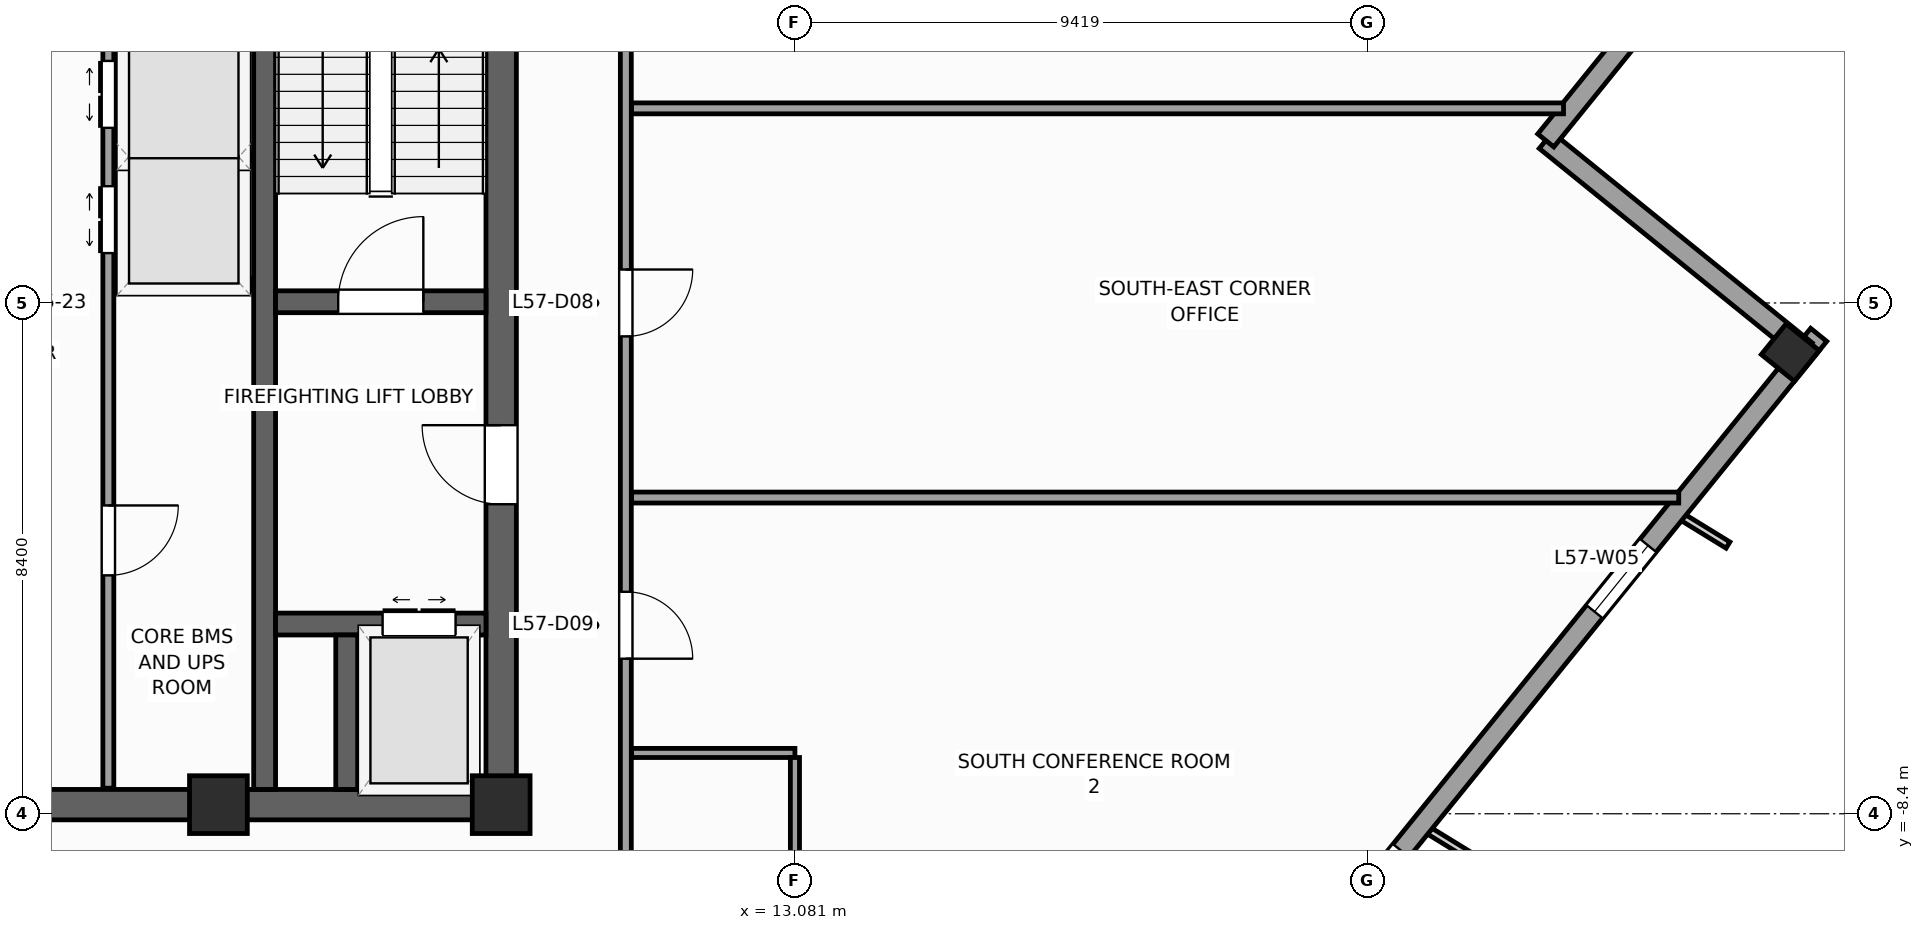
"""IFC4 building model, lengths in metres.
Left out: names, types, materials, properties, quantities, classifications, styles, units other than length and angle.
Written with IfcOpenShell. Run it as: python <this file> out.ifc"""

import sys

from ifc_helpers import new_model, si_unit, direction, frame, frame_2d, origin, origin_2d, place, context, subcontext, project, spatial, rectangle, extrude, source, transform, mapped, element, fill, save


model = new_model("IFC4")
c1 = context("Model", 3, precision=1e-05, world=origin(), true_north=direction((0.0, 1.0)))
c2 = subcontext(c1, "Body", "Model", "MODEL_VIEW")
j1 = project(units=[si_unit("LENGTHUNIT", "METRE"), si_unit("PLANEANGLEUNIT", "RADIAN")], contexts=[c1])
p1 = place(None, origin())
s1 = spatial("IfcSite", under=j1, at=p1, CompositionType="ELEMENT")
p2 = place(p1, origin())
s2 = spatial("IfcBuilding", under=s1, at=p2, CompositionType="ELEMENT")
p3 = place(p2, frame((0.0, 0.0, 236.8)))
s3 = spatial("IfcBuildingStorey", under=s2, at=p3, CompositionType="ELEMENT", Elevation=236.8)
p4 = place(p3, frame((-8.5, -8.25, 0.0), z_axis=(0.0, 0.0, 1.0), x_axis=(1.0, 0.0, 0.0)))
e1 = element("IfcWall", 1, at=p4, inside=s3, PredefinedType="SHEAR", context=c2, shape_type="SweptSolid", body=[
    extrude(rectangle(XDim=17.0, YDim=0.5, at=frame_2d((8.5, 0.0))), origin(), (0.0, 0.0, 1.0), 3.9),
])
p5 = place(p4, frame((7.85, 0.0, 0.0)))
e2 = element("IfcOpeningElement", 2, at=p5, cuts=e1, PredefinedType="OPENING", context=c2, shape_type="SweptSolid", body=[
    extrude(rectangle(XDim=1.3, YDim=2.2, at=frame_2d((0.65, 1.1))), frame((0.0, 0.26, 0.0), z_axis=(0.0, -1.0, 0.0), x_axis=(1.0, 0.0, 0.0)), (0.0, 0.0, 1.0), 0.52),
])
p6 = place(p3, frame((8.25, -8.0, 0.0), z_axis=(0.0, 0.0, 1.0), x_axis=(0.0, 1.0, 0.0)))
e3 = element("IfcWall", 3, at=p6, inside=s3, PredefinedType="SHEAR", context=c2, shape_type="SweptSolid", body=[
    extrude(rectangle(XDim=16.0, YDim=0.5, at=frame_2d((8.0, 0.0))), origin(), (0.0, 0.0, 1.0), 3.9),
])
p7 = place(p6, frame((4.69, 0.0, 0.0)))
e4 = element("IfcOpeningElement", 4, at=p7, cuts=e3, PredefinedType="OPENING", context=c2, shape_type="SweptSolid", body=[
    extrude(rectangle(XDim=1.3, YDim=2.2, at=frame_2d((0.65, 1.1))), frame((0.0, 0.26, 0.0), z_axis=(0.0, -1.0, 0.0), x_axis=(1.0, 0.0, 0.0)), (0.0, 0.0, 1.0), 0.52),
])
p8 = place(p3, frame((4.36, -8.0, 0.0), z_axis=(0.0, 0.0, 1.0), x_axis=(0.0, 1.0, 0.0)))
e5 = element("IfcWall", 5, at=p8, inside=s3, PredefinedType="SHEAR", context=c2, shape_type="SweptSolid", body=[
    extrude(rectangle(XDim=16.0, YDim=0.36, at=frame_2d((8.0, 0.0))), origin(), (0.0, 0.0, 1.0), 3.9),
])
p9 = place(p3, frame((4.54, 0.02, 0.0), z_axis=(0.0, 0.0, 1.0), x_axis=(1.0, 0.0, 0.0)))
e6 = element("IfcWall", 6, at=p9, inside=s3, PredefinedType="SHEAR", context=c2, shape_type="SweptSolid", body=[
    extrude(rectangle(XDim=3.46, YDim=0.36, at=frame_2d((1.73, 0.0))), origin(), (0.0, 0.0, 1.0), 3.9),
])
p10 = place(p9, frame((1.03, 0.0, 0.0)))
e7 = element("IfcOpeningElement", 7, at=p10, cuts=e6, PredefinedType="OPENING", context=c2, shape_type="SweptSolid", body=[
    extrude(rectangle(XDim=1.4, YDim=2.2, at=frame_2d((0.7, 1.1))), frame((0.0, 0.19, 0.0), z_axis=(0.0, -1.0, 0.0), x_axis=(1.0, 0.0, 0.0)), (0.0, 0.0, 1.0), 0.38),
])
p11 = place(p3, frame((4.54, -5.28, 0.0), z_axis=(0.0, 0.0, 1.0), x_axis=(1.0, 0.0, 0.0)))
e8 = element("IfcWall", 8, at=p11, inside=s3, PredefinedType="SHEAR", context=c2, shape_type="SweptSolid", body=[
    extrude(rectangle(XDim=3.46, YDim=0.36, at=frame_2d((1.73, 0.0))), origin(), (0.0, 0.0, 1.0), 3.9),
])
p12 = place(p11, frame((1.76, 0.0, 0.0)))
e9 = element("IfcOpeningElement", 9, at=p12, cuts=e8, PredefinedType="OPENING", context=c2, shape_type="SweptSolid", body=[
    extrude(rectangle(XDim=1.2, YDim=2.25, at=frame_2d((0.6, 1.125))), frame((0.0, 0.19, 0.0), z_axis=(0.0, -1.0, 0.0), x_axis=(1.0, 0.0, 0.0)), (0.0, 0.0, 1.0), 0.38),
])
p13 = place(p3, frame((5.71, -8.0, 0.0), z_axis=(0.0, 0.0, 1.0), x_axis=(0.0, 1.0, 0.0)))
e10 = element("IfcWall", 10, at=p13, inside=s3, PredefinedType="SHEAR", context=c2, shape_type="SweptSolid", body=[
    extrude(rectangle(XDim=2.54, YDim=0.36, at=frame_2d((1.27, 0.0))), origin(), (0.0, 0.0, 1.0), 3.9),
])
m1 = source(origin(), c2, "Body", "SweptSolid", [
    extrude(rectangle(XDim=0.95, YDim=0.95, at=origin_2d()), origin(), (0.0, 0.0, 1.0), 3.9),
])
for number, where, z_axis, x_axis in (
    (11, (8.25, -8.25, 0.0), (0.0, 0.0, 1.0), (1.0, 0.0, 0.0)),
    (12, (3.6, -8.25, 0.0), (0.0, 0.0, 1.0), (1.0, 0.0, 0.0)),
):
    element("IfcColumn", number, at=place(p3, frame(where, z_axis=z_axis, x_axis=x_axis)), inside=s3, PredefinedType="PILASTER", context=c2, shape_type="MappedRepresentation", body=[
        mapped(m1, transform((0.0, 0.0, 0.0), scale=1.0)),
    ])
m2 = source(origin(), c2, "Body", "SweptSolid", [
    extrude(rectangle(XDim=0.65, YDim=0.7, at=origin_2d()), origin(), (0.0, 0.0, 1.0), 3.9),
])
p14 = place(p3, frame((29.45, -0.815, 0.0), z_axis=(0.0, 0.0, 1.0), x_axis=(0.62932039105, 0.777145961457, 0.0)))
e13 = element("IfcColumn", 13, at=p14, inside=s3, PredefinedType="COLUMN", context=c2, shape_type="MappedRepresentation", body=[
    mapped(m2, transform((0.0, 0.0, 0.0), scale=1.0)),
])
p15 = place(p3, frame((6.733, -29.154, 0.0), z_axis=(0.0, 0.0, 1.0), x_axis=(0.629325378072, 0.77714192302, 0.0)))
e14 = element("IfcWall", 14, at=p15, inside=s3, PredefinedType="STANDARD", context=c2, shape_type="SweptSolid", body=[
    extrude(rectangle(XDim=36.84, YDim=0.34, at=frame_2d((18.42, 0.0))), origin(), (0.0, 0.0, 1.0), 2.96),
])
p16 = place(p15, frame((12.295, 0.0, 0.0)))
e15 = element("IfcOpeningElement", 15, at=p16, cuts=e14, PredefinedType="OPENING", context=c2, shape_type="SweptSolid", body=[
    extrude(rectangle(XDim=1.05, YDim=2.25, at=frame_2d((0.525, 1.125))), frame((0.0, 0.18, 0.0), z_axis=(0.0, -1.0, 0.0), x_axis=(1.0, 0.0, 0.0)), (0.0, 0.0, 1.0), 0.36),
])
p17 = place(p15, frame((3.721, 0.0, 0.48)))
e16 = element("IfcOpeningElement", 16, at=p17, cuts=e14, PredefinedType="OPENING", context=c2, shape_type="SweptSolid", body=[
    extrude(rectangle(XDim=1.4, YDim=2.4, at=frame_2d((0.7, 1.2))), frame((0.0, 0.18, 0.0), z_axis=(0.0, -1.0, 0.0), x_axis=(1.0, 0.0, 0.0)), (0.0, 0.0, 1.0), 0.36),
])
p18 = place(p15, frame((7.559, 0.0, 0.58)))
e17 = element("IfcOpeningElement", 17, at=p18, cuts=e14, PredefinedType="OPENING", context=c2, shape_type="SweptSolid", body=[
    extrude(rectangle(XDim=1.75, YDim=2.3, at=frame_2d((0.875, 1.15))), frame((0.0, 0.18, 0.0), z_axis=(0.0, -1.0, 0.0), x_axis=(1.0, 0.0, 0.0)), (0.0, 0.0, 1.0), 0.36),
])
p19 = place(p15, frame((16.058, 0.0, 0.58)))
e18 = element("IfcOpeningElement", 18, at=p19, cuts=e14, PredefinedType="OPENING", context=c2, shape_type="SweptSolid", body=[
    extrude(rectangle(XDim=1.75, YDim=2.3, at=frame_2d((0.875, 1.15))), frame((0.0, 0.18, 0.0), z_axis=(0.0, -1.0, 0.0), x_axis=(1.0, 0.0, 0.0)), (0.0, 0.0, 1.0), 0.36),
])
p20 = place(p15, frame((24.176, 0.0, 0.58)))
e19 = element("IfcOpeningElement", 19, at=p20, cuts=e14, PredefinedType="OPENING", context=c2, shape_type="SweptSolid", body=[
    extrude(rectangle(XDim=1.75, YDim=2.3, at=frame_2d((0.875, 1.15))), frame((0.0, 0.18, 0.0), z_axis=(0.0, -1.0, 0.0), x_axis=(1.0, 0.0, 0.0)), (0.0, 0.0, 1.0), 0.36),
])
p21 = place(p15, frame((30.982, 0.0, 0.48)))
e20 = element("IfcOpeningElement", 20, at=p21, cuts=e14, PredefinedType="OPENING", context=c2, shape_type="SweptSolid", body=[
    extrude(rectangle(XDim=1.4, YDim=2.4, at=frame_2d((0.7, 1.2))), frame((0.0, 0.18, 0.0), z_axis=(0.0, -1.0, 0.0), x_axis=(1.0, 0.0, 0.0)), (0.0, 0.0, 1.0), 0.36),
])
p22 = place(p3, frame((29.703, -0.789, 0.0), z_axis=(0.0, 0.0, 1.0), x_axis=(-0.77714355312, 0.629323365087, 0.0)))
e21 = element("IfcWall", 21, at=p22, inside=s3, PredefinedType="STANDARD", context=c2, shape_type="SweptSolid", body=[
    extrude(rectangle(XDim=5.5, YDim=0.34, at=frame_2d((2.75, 0.0))), origin(), (0.0, 0.0, 1.0), 3.66),
])
p23 = place(p3, frame((25.429, 2.673, 0.0), z_axis=(0.0, 0.0, 1.0), x_axis=(0.629299794138, 0.777162640055, 0.0)))
e22 = element("IfcWall", 22, at=p23, inside=s3, PredefinedType="STANDARD", context=c2, shape_type="SweptSolid", body=[
    extrude(rectangle(XDim=5.67, YDim=0.34, at=frame_2d((2.835, 0.0))), origin(), (0.0, 0.0, 1.0), 3.66),
])
p24 = place(p23, frame((2.135, 0.0, 0.48)))
e23 = element("IfcOpeningElement", 23, at=p24, cuts=e22, PredefinedType="OPENING", context=c2, shape_type="SweptSolid", body=[
    extrude(rectangle(XDim=1.4, YDim=2.4, at=frame_2d((0.7, 1.2))), frame((0.0, 0.18, 0.0), z_axis=(0.0, -1.0, 0.0), x_axis=(1.0, 0.0, 0.0)), (0.0, 0.0, 1.0), 0.36),
])
p25 = place(p3, frame((1.79, -7.98, 0.0), z_axis=(0.0, 0.0, 1.0), x_axis=(0.0, 1.0, 0.0)))
e24 = element("IfcWall", 24, at=p25, inside=s3, PredefinedType="PARTITIONING", context=c2, shape_type="SweptSolid", body=[
    extrude(rectangle(XDim=12.38, YDim=0.18, at=frame_2d((6.19, 0.0))), origin(), (0.0, 0.0, 1.0), 3.66),
])
p26 = place(p25, frame((8.8, 0.0, 0.0)))
e25 = element("IfcOpeningElement", 25, at=p26, cuts=e24, PredefinedType="OPENING", context=c2, shape_type="SweptSolid", body=[
    extrude(rectangle(XDim=1.1, YDim=2.2, at=frame_2d((0.55, 1.1))), frame((0.0, 0.1, 0.0), z_axis=(0.0, -1.0, 0.0), x_axis=(1.0, 0.0, 0.0)), (0.0, 0.0, 1.0), 0.2),
])
p27 = place(p25, frame((10.86, 0.0, 0.0)))
e26 = element("IfcOpeningElement", 26, at=p27, cuts=e24, PredefinedType="OPENING", context=c2, shape_type="SweptSolid", body=[
    extrude(rectangle(XDim=1.1, YDim=2.2, at=frame_2d((0.55, 1.1))), frame((0.0, 0.1, 0.0), z_axis=(0.0, -1.0, 0.0), x_axis=(1.0, 0.0, 0.0)), (0.0, 0.0, 1.0), 0.2),
])
p28 = place(p25, frame((3.5, 0.0, 0.0)))
e27 = element("IfcOpeningElement", 27, at=p28, cuts=e24, PredefinedType="OPENING", context=c2, shape_type="SweptSolid", body=[
    extrude(rectangle(XDim=1.15, YDim=2.25, at=frame_2d((0.575, 1.125))), frame((0.0, 0.1, 0.0), z_axis=(0.0, -1.0, 0.0), x_axis=(1.0, 0.0, 0.0)), (0.0, 0.0, 1.0), 0.2),
])
p29 = place(p3, frame((1.89, 0.3, 0.0), z_axis=(0.0, 0.0, 1.0), x_axis=(1.0, 0.0, 0.0)))
e28 = element("IfcWall", 28, at=p29, inside=s3, PredefinedType="PARTITIONING", context=c2, shape_type="SweptSolid", body=[
    extrude(rectangle(XDim=2.28, YDim=0.18, at=frame_2d((1.14, 0.0))), origin(), (0.0, 0.0, 1.0), 3.66),
])
p30 = place(p3, frame((1.9, 2.4, 0.0), z_axis=(0.0, 0.0, 1.0), x_axis=(1.0, 0.0, 0.0)))
e29 = element("IfcWall", 29, at=p30, inside=s3, PredefinedType="PARTITIONING", context=c2, shape_type="SweptSolid", body=[
    extrude(rectangle(XDim=2.26, YDim=0.12, at=frame_2d((1.13, 0.0))), origin(), (0.0, 0.0, 1.0), 3.66),
])
p31 = place(p3, frame((10.3, -10.2, 0.0), z_axis=(0.0, 0.0, 1.0), x_axis=(0.0, 1.0, 0.0)))
e30 = element("IfcWall", 30, at=p31, inside=s3, PredefinedType="PARTITIONING", context=c2, shape_type="SweptSolid", body=[
    extrude(rectangle(XDim=20.4, YDim=0.18, at=frame_2d((10.2, 0.0))), origin(), (0.0, 0.0, 1.0), 3.66),
])
p32 = place(p31, frame((14.95, 0.0, 0.0)))
e31 = element("IfcOpeningElement", 31, at=p32, cuts=e30, PredefinedType="OPENING", context=c2, shape_type="SweptSolid", body=[
    extrude(rectangle(XDim=1.1, YDim=2.2, at=frame_2d((0.55, 1.1))), frame((0.0, 0.1, 0.0), z_axis=(0.0, -1.0, 0.0), x_axis=(1.0, 0.0, 0.0)), (0.0, 0.0, 1.0), 0.2),
])
p33 = place(p31, frame((9.65, 0.0, 0.0)))
e32 = element("IfcOpeningElement", 32, at=p33, cuts=e30, PredefinedType="OPENING", context=c2, shape_type="SweptSolid", body=[
    extrude(rectangle(XDim=1.1, YDim=2.2, at=frame_2d((0.55, 1.1))), frame((0.0, 0.1, 0.0), z_axis=(0.0, -1.0, 0.0), x_axis=(1.0, 0.0, 0.0)), (0.0, 0.0, 1.0), 0.2),
])
p34 = place(p31, frame((4.35, 0.0, 0.0)))
e33 = element("IfcOpeningElement", 33, at=p34, cuts=e30, PredefinedType="OPENING", context=c2, shape_type="SweptSolid", body=[
    extrude(rectangle(XDim=1.1, YDim=2.2, at=frame_2d((0.55, 1.1))), frame((0.0, 0.1, 0.0), z_axis=(0.0, -1.0, 0.0), x_axis=(1.0, 0.0, 0.0)), (0.0, 0.0, 1.0), 0.2),
])
p35 = place(p3, frame((10.395, 3.2, 0.0), z_axis=(0.0, 0.0, 1.0), x_axis=(1.0, 0.0, 0.0)))
e34 = element("IfcWall", 34, at=p35, inside=s3, PredefinedType="PARTITIONING", context=c2, shape_type="SweptSolid", body=[
    extrude(rectangle(XDim=15.326, YDim=0.18, at=frame_2d((7.663, 0.0))), origin(), (0.0, 0.0, 1.0), 3.66),
])
p36 = place(p3, frame((10.395, -3.2, 0.0), z_axis=(0.0, 0.0, 1.0), x_axis=(1.0, 0.0, 0.0)))
e35 = element("IfcWall", 35, at=p36, inside=s3, PredefinedType="PARTITIONING", context=c2, shape_type="SweptSolid", body=[
    extrude(rectangle(XDim=17.22, YDim=0.18, at=frame_2d((8.61, 0.0))), origin(), (0.0, 0.0, 1.0), 3.66),
])
p37 = place(p3, frame((10.395, -7.4, 0.0), z_axis=(0.0, 0.0, 1.0), x_axis=(1.0, 0.0, 0.0)))
e36 = element("IfcWall", 36, at=p37, inside=s3, PredefinedType="PARTITIONING", context=c2, shape_type="SweptSolid", body=[
    extrude(rectangle(XDim=2.686, YDim=0.15, at=frame_2d((1.343, 0.0))), origin(), (0.0, 0.0, 1.0), 3.66),
])
p38 = place(p3, frame((13.081, -7.475, 0.0), z_axis=(0.0, 0.0, 1.0), x_axis=(0.0, -1.0, 0.0)))
e37 = element("IfcWall", 37, at=p38, inside=s3, PredefinedType="PARTITIONING", context=c2, shape_type="SweptSolid", body=[
    extrude(rectangle(XDim=13.673, YDim=0.15, at=frame_2d((6.837, 0.0))), origin(), (0.0, 0.0, 1.0), 2.76),
])
m3 = source(origin(), c2, "Body", "SweptSolid", [
    extrude(rectangle(XDim=1.75, YDim=2.3, at=frame_2d((0.875, 1.15))), frame((0.0, 0.03, 0.0), z_axis=(0.0, -1.0, 0.0), x_axis=(1.0, 0.0, 0.0)), (0.0, 0.0, 1.0), 0.06),
])
p39 = place(p20, origin())
e38 = element("IfcWindow", 38, at=p39, inside=s3, PartitioningType="SINGLE_PANEL", PredefinedType="WINDOW", context=c2, shape_type="MappedRepresentation", body=[
    mapped(m3, transform((0.0, 0.0, 0.0), scale=1.0)),
])
fill(e19, e38)
m4 = source(origin(), c2, "Body", "SweptSolid", [
    extrude(rectangle(XDim=1.4, YDim=2.4, at=frame_2d((0.7, 1.2))), frame((0.0, 0.03, 0.0), z_axis=(0.0, -1.0, 0.0), x_axis=(1.0, 0.0, 0.0)), (0.0, 0.0, 1.0), 0.06),
])
p40 = place(p21, origin())
e39 = element("IfcWindow", 39, at=p40, inside=s3, PartitioningType="SINGLE_PANEL", PredefinedType="WINDOW", context=c2, shape_type="MappedRepresentation", body=[
    mapped(m4, transform((0.0, 0.0, 0.0), scale=1.0)),
])
fill(e20, e39)
m5 = source(origin(), c2, "Body", "SweptSolid", [
    extrude(rectangle(XDim=1.4, YDim=2.2, at=frame_2d((0.7, 1.1))), frame((0.0, 0.025, 0.0), z_axis=(0.0, -1.0, 0.0), x_axis=(1.0, 0.0, 0.0)), (0.0, 0.0, 1.0), 0.05),
])
p41 = place(p10, origin())
e40 = element("IfcDoor", 40, at=p41, inside=s3, OperationType="SINGLE_SWING_RIGHT", PredefinedType="DOOR", context=c2, shape_type="MappedRepresentation", body=[
    mapped(m5, transform((0.0, 0.0, 0.0), scale=1.0)),
])
fill(e7, e40)
m6 = source(origin(), c2, "Body", "SweptSolid", [
    extrude(rectangle(XDim=1.3, YDim=2.2, at=frame_2d((0.65, 1.1))), frame((0.0, 0.025, 0.0), z_axis=(0.0, -1.0, 0.0), x_axis=(1.0, 0.0, 0.0)), (0.0, 0.0, 1.0), 0.05),
])
p42 = place(p7, origin())
e41 = element("IfcDoor", 41, at=p42, inside=s3, OperationType="SINGLE_SWING_RIGHT", PredefinedType="DOOR", context=c2, shape_type="MappedRepresentation", body=[
    mapped(m6, transform((0.0, 0.0, 0.0), scale=1.0)),
])
fill(e4, e41)
m7 = source(origin(), c2, "Body", "SweptSolid", [
    extrude(rectangle(XDim=1.2, YDim=2.25, at=frame_2d((0.6, 1.125))), frame((0.0, 0.025, 0.0), z_axis=(0.0, -1.0, 0.0), x_axis=(1.0, 0.0, 0.0)), (0.0, 0.0, 1.0), 0.05),
])
p43 = place(p12, origin())
e42 = element("IfcDoor", 42, at=p43, inside=s3, OperationType="DOUBLE_DOOR_SLIDING", PredefinedType="DOOR", context=c2, shape_type="MappedRepresentation", body=[
    mapped(m7, transform((0.0, 0.0, 0.0), scale=1.0)),
])
fill(e9, e42)
m8 = source(origin(), c2, "Body", "SweptSolid", [
    extrude(rectangle(XDim=1.1, YDim=2.2, at=frame_2d((0.55, 1.1))), frame((0.0, 0.025, 0.0), z_axis=(0.0, -1.0, 0.0), x_axis=(1.0, 0.0, 0.0)), (0.0, 0.0, 1.0), 0.05),
])
p44 = place(p26, origin())
e43 = element("IfcDoor", 43, at=p44, inside=s3, OperationType="DOUBLE_DOOR_SLIDING", PredefinedType="DOOR", context=c2, shape_type="MappedRepresentation", body=[
    mapped(m8, transform((0.0, 0.0, 0.0), scale=1.0)),
])
fill(e25, e43)
p45 = place(p27, origin())
e44 = element("IfcDoor", 44, at=p45, inside=s3, OperationType="DOUBLE_DOOR_SLIDING", PredefinedType="DOOR", context=c2, shape_type="MappedRepresentation", body=[
    mapped(m8, transform((0.0, 0.0, 0.0), scale=1.0)),
])
fill(e26, e44)
m9 = source(origin(), c2, "Body", "SweptSolid", [
    extrude(rectangle(XDim=1.15, YDim=2.25, at=frame_2d((0.575, 1.125))), frame((0.0, 0.025, 0.0), z_axis=(0.0, -1.0, 0.0), x_axis=(1.0, 0.0, 0.0)), (0.0, 0.0, 1.0), 0.05),
])
p46 = place(p28, frame((1.15, 0.0, 0.0), z_axis=(0.0, 0.0, 1.0), x_axis=(-1.0, 0.0, 0.0)))
e45 = element("IfcDoor", 45, at=p46, inside=s3, OperationType="SINGLE_SWING_RIGHT", PredefinedType="DOOR", context=c2, shape_type="MappedRepresentation", body=[
    mapped(m9, transform((0.0, 0.0, 0.0), scale=1.0)),
])
fill(e27, e45)
p47 = place(p33, frame((1.1, 0.0, 0.0), z_axis=(0.0, 0.0, 1.0), x_axis=(-1.0, 0.0, 0.0)))
e46 = element("IfcDoor", 46, at=p47, inside=s3, OperationType="SINGLE_SWING_RIGHT", PredefinedType="DOOR", context=c2, shape_type="MappedRepresentation", body=[
    mapped(m8, transform((0.0, 0.0, 0.0), scale=1.0)),
])
fill(e32, e46)
p48 = place(p34, frame((1.1, 0.0, 0.0), z_axis=(0.0, 0.0, 1.0), x_axis=(-1.0, 0.0, 0.0)))
e47 = element("IfcDoor", 47, at=p48, inside=s3, OperationType="SINGLE_SWING_LEFT", PredefinedType="DOOR", context=c2, shape_type="MappedRepresentation", body=[
    mapped(m8, transform((0.0, 0.0, 0.0), scale=1.0)),
])
fill(e33, e47)
save(model, sys.argv[1])
